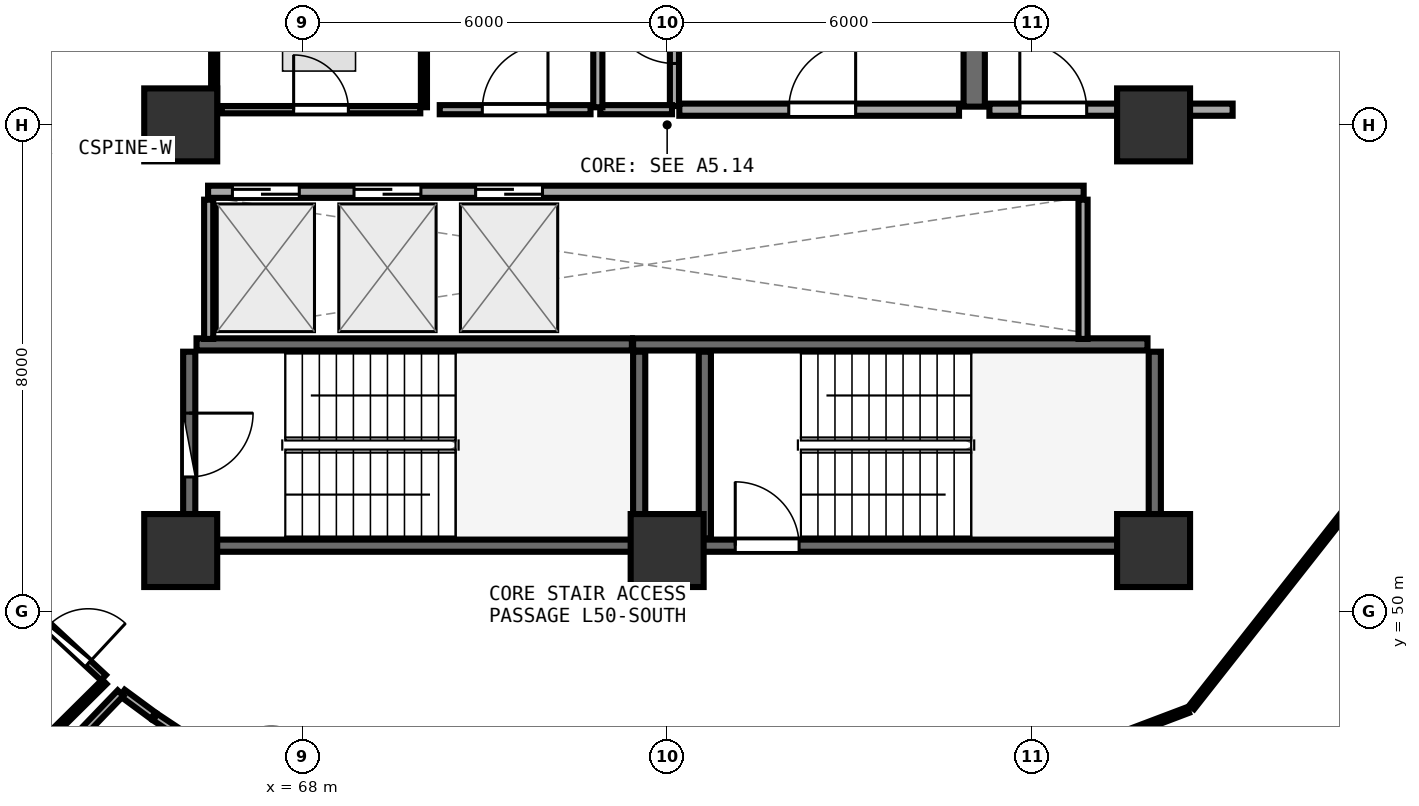
"""IFC4 building model, lengths in metres.
Left out: names, types, materials, properties, quantities, classifications, styles, units other than length and angle.
Written with IfcOpenShell. Run it as: python <this file> out.ifc"""

import sys

from ifc_helpers import new_model, si_unit, direction, frame, frame_2d, origin, origin_2d, place, context, subcontext, project, spatial, rectangle, extrude, element, fill, save


model = new_model("IFC4")
c1 = context("Model", 3, precision=1e-05, world=origin(), true_north=direction((0.0, 1.0)))
c2 = subcontext(c1, "Body", "Model", "MODEL_VIEW")
j1 = project(units=[si_unit("LENGTHUNIT", "METRE"), si_unit("PLANEANGLEUNIT", "RADIAN")], contexts=[c1])
p1 = place(None, origin())
s1 = spatial("IfcSite", under=j1, at=p1, CompositionType="ELEMENT")
p2 = place(p1, origin())
s2 = spatial("IfcBuilding", under=s1, at=p2, CompositionType="ELEMENT")
p3 = place(p2, frame((0.0, 0.0, 196.95)))
s3 = spatial("IfcBuildingStorey", under=s2, at=p3, CompositionType="ELEMENT", Elevation=196.95)
for number, where, z_axis, x_axis in (
    (1, (66.0, 51.0, 0.0), (0.0, 0.0, 1.0), (1.0, 0.0, 0.0)),
    (2, (74.0, 51.0, 0.0), (0.0, 0.0, 1.0), (1.0, 0.0, 0.0)),
    (3, (82.0, 51.0, 0.0), (0.0, 0.0, 1.0), (1.0, 0.0, 0.0)),
    (4, (82.0, 58.0, 0.0), (0.0, 0.0, 1.0), (1.0, 0.0, 0.0)),
    (5, (66.0, 58.0, 0.0), (0.0, 0.0, 1.0), (1.0, 0.0, 0.0)),
):
    element("IfcColumn", number, at=place(p3, frame(where, z_axis=z_axis, x_axis=x_axis)), inside=s3, PredefinedType="PILASTER", context=c2, shape_type="SweptSolid", body=[
        extrude(rectangle(XDim=1.2, YDim=1.2, at=origin_2d()), origin(), (0.0, 0.0, 1.0), 3.75),
    ])
p4 = place(p3, frame((74.0, 51.08, 0.0), z_axis=(0.0, 0.0, 1.0), x_axis=(1.0, 0.0, 0.0)))
e6 = element("IfcWall", 6, at=p4, inside=s3, PredefinedType="SHEAR", context=c2, shape_type="SweptSolid", body=[
    extrude(rectangle(XDim=7.9, YDim=0.2, at=frame_2d((3.95, 0.0))), origin(), (0.0, 0.0, 1.0), 3.49),
])
p5 = place(p4, frame((1.12, 0.0, 0.0)))
e7 = element("IfcOpeningElement", 7, at=p5, cuts=e6, PredefinedType="OPENING", context=c2, shape_type="SweptSolid", body=[
    extrude(rectangle(XDim=1.05, YDim=2.1, at=frame_2d((0.525, 1.05))), frame((0.0, 0.11, 0.0), z_axis=(0.0, -1.0, 0.0), x_axis=(1.0, 0.0, 0.0)), (0.0, 0.0, 1.0), 0.22),
])
p6 = place(p3, frame((82.02, 51.2, 0.0), z_axis=(0.0, 0.0, 1.0), x_axis=(0.0, 1.0, 0.0)))
e8 = element("IfcWall", 8, at=p6, inside=s3, PredefinedType="SHEAR", context=c2, shape_type="SweptSolid", body=[
    extrude(rectangle(XDim=3.07, YDim=0.2, at=frame_2d((1.535, 0.0))), origin(), (0.0, 0.0, 1.0), 3.49),
])
p7 = place(p3, frame((81.9, 54.39, 0.0), z_axis=(0.0, 0.0, 1.0), x_axis=(-1.0, 0.0, 0.0)))
e9 = element("IfcWall", 9, at=p7, inside=s3, PredefinedType="SHEAR", context=c2, shape_type="SweptSolid", body=[
    extrude(rectangle(XDim=8.46, YDim=0.2, at=frame_2d((4.23, 0.0))), origin(), (0.0, 0.0, 1.0), 3.49),
])
p8 = place(p3, frame((74.62, 54.27, 0.0), z_axis=(0.0, 0.0, 1.0), x_axis=(0.0, -1.0, 0.0)))
e10 = element("IfcWall", 10, at=p8, inside=s3, PredefinedType="SHEAR", context=c2, shape_type="SweptSolid", body=[
    extrude(rectangle(XDim=3.07, YDim=0.2, at=frame_2d((1.535, 0.0))), origin(), (0.0, 0.0, 1.0), 3.49),
])
p9 = place(p3, frame((66.26, 51.08, 0.0), z_axis=(0.0, 0.0, 1.0), x_axis=(1.0, 0.0, 0.0)))
e11 = element("IfcWall", 11, at=p9, inside=s3, PredefinedType="SHEAR", context=c2, shape_type="SweptSolid", body=[
    extrude(rectangle(XDim=7.16, YDim=0.2, at=frame_2d((3.58, 0.0))), origin(), (0.0, 0.0, 1.0), 3.49),
])
p10 = place(p3, frame((73.54, 51.2, 0.0), z_axis=(0.0, 0.0, 1.0), x_axis=(0.0, 1.0, 0.0)))
e12 = element("IfcWall", 12, at=p10, inside=s3, PredefinedType="SHEAR", context=c2, shape_type="SweptSolid", body=[
    extrude(rectangle(XDim=3.07, YDim=0.2, at=frame_2d((1.535, 0.0))), origin(), (0.0, 0.0, 1.0), 3.49),
])
p11 = place(p3, frame((73.42, 54.39, 0.0), z_axis=(0.0, 0.0, 1.0), x_axis=(-1.0, 0.0, 0.0)))
e13 = element("IfcWall", 13, at=p11, inside=s3, PredefinedType="SHEAR", context=c2, shape_type="SweptSolid", body=[
    extrude(rectangle(XDim=7.16, YDim=0.2, at=frame_2d((3.58, 0.0))), origin(), (0.0, 0.0, 1.0), 3.49),
])
p12 = place(p3, frame((66.14, 54.27, 0.0), z_axis=(0.0, 0.0, 1.0), x_axis=(0.0, -1.0, 0.0)))
e14 = element("IfcWall", 14, at=p12, inside=s3, PredefinedType="SHEAR", context=c2, shape_type="SweptSolid", body=[
    extrude(rectangle(XDim=3.07, YDim=0.2, at=frame_2d((1.535, 0.0))), origin(), (0.0, 0.0, 1.0), 3.49),
])
p13 = place(p12, frame((1.01, 0.0, 0.0)))
e15 = element("IfcOpeningElement", 15, at=p13, cuts=e14, PredefinedType="OPENING", context=c2, shape_type="SweptSolid", body=[
    extrude(rectangle(XDim=1.05, YDim=2.1, at=frame_2d((0.525, 1.05))), frame((0.0, 0.11, 0.0), z_axis=(0.0, -1.0, 0.0), x_axis=(1.0, 0.0, 0.0)), (0.0, 0.0, 1.0), 0.22),
])
p14 = place(p3, frame((79.05, 58.3, 0.0), z_axis=(0.0, 0.0, 1.0), x_axis=(0.0, 1.0, 0.0)))
e16 = element("IfcWall", 16, at=p14, inside=s3, PredefinedType="SHEAR", context=c2, shape_type="SweptSolid", body=[
    extrude(rectangle(XDim=6.3, YDim=0.35, at=frame_2d((3.15, 0.0))), origin(), (0.0, 0.0, 1.0), 3.49),
])
p15 = place(p3, frame((74.2, 58.25, 0.0), z_axis=(0.0, 0.0, 1.0), x_axis=(1.0, 0.0, 0.0)))
e17 = element("IfcWall", 17, at=p15, inside=s3, PredefinedType="SOLIDWALL", context=c2, shape_type="SweptSolid", body=[
    extrude(rectangle(XDim=4.6, YDim=0.2, at=frame_2d((2.3, 0.0))), origin(), (0.0, 0.0, 1.0), 3.48),
])
p16 = place(p15, frame((1.8, 0.0, 0.0)))
e18 = element("IfcOpeningElement", 18, at=p16, cuts=e17, PredefinedType="OPENING", context=c2, shape_type="SweptSolid", body=[
    extrude(rectangle(XDim=1.1, YDim=2.1, at=frame_2d((0.55, 1.05))), frame((0.0, 0.11, 0.0), z_axis=(0.0, -1.0, 0.0), x_axis=(1.0, 0.0, 0.0)), (0.0, 0.0, 1.0), 0.22),
])
p17 = place(p3, frame((79.3, 58.25, 0.0), z_axis=(0.0, 0.0, 1.0), x_axis=(1.0, 0.0, 0.0)))
e19 = element("IfcWall", 19, at=p17, inside=s3, PredefinedType="SOLIDWALL", context=c2, shape_type="SweptSolid", body=[
    extrude(rectangle(XDim=4.0, YDim=0.2, at=frame_2d((2.0, 0.0))), origin(), (0.0, 0.0, 1.0), 2.775),
])
p18 = place(p17, frame((0.5, 0.0, 0.0)))
e20 = element("IfcOpeningElement", 20, at=p18, cuts=e19, PredefinedType="OPENING", context=c2, shape_type="SweptSolid", body=[
    extrude(rectangle(XDim=1.1, YDim=2.1, at=frame_2d((0.55, 1.05))), frame((0.0, 0.11, 0.0), z_axis=(0.0, -1.0, 0.0), x_axis=(1.0, 0.0, 0.0)), (0.0, 0.0, 1.0), 0.22),
])
p19 = place(p3, frame((66.45, 56.9, 0.0), z_axis=(0.0, 0.0, 1.0), x_axis=(1.0, 0.0, 0.0)))
e21 = element("IfcWall", 21, at=p19, inside=s3, PredefinedType="SOLIDWALL", context=c2, shape_type="SweptSolid", body=[
    extrude(rectangle(XDim=14.4, YDim=0.2, at=frame_2d((7.2, 0.0))), origin(), (0.0, 0.0, 1.0), 3.48),
])
p20 = place(p19, frame((0.4, 0.0, 0.0)))
e22 = element("IfcOpeningElement", 22, at=p20, cuts=e21, PredefinedType="OPENING", context=c2, shape_type="SweptSolid", body=[
    extrude(rectangle(XDim=1.1, YDim=2.1, at=frame_2d((0.55, 1.05))), frame((0.0, 0.11, 0.0), z_axis=(0.0, -1.0, 0.0), x_axis=(1.0, 0.0, 0.0)), (0.0, 0.0, 1.0), 0.22),
])
p21 = place(p19, frame((2.4, 0.0, 0.0)))
e23 = element("IfcOpeningElement", 23, at=p21, cuts=e21, PredefinedType="OPENING", context=c2, shape_type="SweptSolid", body=[
    extrude(rectangle(XDim=1.1, YDim=2.1, at=frame_2d((0.55, 1.05))), frame((0.0, 0.11, 0.0), z_axis=(0.0, -1.0, 0.0), x_axis=(1.0, 0.0, 0.0)), (0.0, 0.0, 1.0), 0.22),
])
p22 = place(p19, frame((4.4, 0.0, 0.0)))
e24 = element("IfcOpeningElement", 24, at=p22, cuts=e21, PredefinedType="OPENING", context=c2, shape_type="SweptSolid", body=[
    extrude(rectangle(XDim=1.1, YDim=2.1, at=frame_2d((0.55, 1.05))), frame((0.0, 0.11, 0.0), z_axis=(0.0, -1.0, 0.0), x_axis=(1.0, 0.0, 0.0)), (0.0, 0.0, 1.0), 0.22),
])
for number, where, z_axis, x_axis in (
    (25, (66.46, 54.48, 0.0), (0.0, 0.0, 1.0), (0.0, 1.0, 0.0)),
    (26, (80.84, 54.48, 0.0), (0.0, 0.0, 1.0), (0.0, 1.0, 0.0)),
):
    element("IfcWall", number, at=place(p3, frame(where, z_axis=z_axis, x_axis=x_axis)), inside=s3, PredefinedType="PARTITIONING", context=c2, shape_type="SweptSolid", body=[
        extrude(rectangle(XDim=2.29, YDim=0.15, at=frame_2d((1.145, 0.0))), origin(), (0.0, 0.0, 1.0), 3.48),
    ])
p23 = place(p3, frame((74.12, 58.31, 0.0), z_axis=(0.0, 0.0, 1.0), x_axis=(0.0, 1.0, 0.0)))
e27 = element("IfcWall", 27, at=p23, inside=s3, PredefinedType="PARTITIONING", context=c2, shape_type="SweptSolid", body=[
    extrude(rectangle(XDim=2.48, YDim=0.15, at=frame_2d((1.24, 0.0))), origin(), (0.0, 0.0, 1.0), 3.48),
])
p24 = place(p23, frame((0.7, 0.0, 0.0)))
e28 = element("IfcOpeningElement", 28, at=p24, cuts=e27, PredefinedType="OPENING", context=c2, shape_type="SweptSolid", body=[
    extrude(rectangle(XDim=1.08, YDim=2.1, at=frame_2d((0.54, 1.05))), frame((0.0, 0.085, 0.0), z_axis=(0.0, -1.0, 0.0), x_axis=(1.0, 0.0, 0.0)), (0.0, 0.0, 1.0), 0.17),
])
p25 = place(p3, frame((66.675, 58.25, 0.0), z_axis=(0.0, 0.0, 1.0), x_axis=(1.0, 0.0, 0.0)))
e29 = element("IfcWall", 29, at=p25, inside=s3, PredefinedType="PARTITIONING", context=c2, shape_type="SweptSolid", body=[
    extrude(rectangle(XDim=3.265, YDim=0.12, at=frame_2d((1.632, 0.0))), origin(), (0.0, 0.0, 1.0), 3.48),
])
p26 = place(p25, frame((1.182, 0.0, 0.0)))
e30 = element("IfcOpeningElement", 30, at=p26, cuts=e29, PredefinedType="OPENING", context=c2, shape_type="SweptSolid", body=[
    extrude(rectangle(XDim=0.9, YDim=2.08, at=frame_2d((0.45, 1.04))), frame((0.0, 0.07, 0.0), z_axis=(0.0, -1.0, 0.0), x_axis=(1.0, 0.0, 0.0)), (0.0, 0.0, 1.0), 0.14),
])
p27 = place(p3, frame((70.26, 58.25, 0.0), z_axis=(0.0, 0.0, 1.0), x_axis=(1.0, 0.0, 0.0)))
e31 = element("IfcWall", 31, at=p27, inside=s3, PredefinedType="PARTITIONING", context=c2, shape_type="SweptSolid", body=[
    extrude(rectangle(XDim=2.48, YDim=0.15, at=frame_2d((1.24, 0.0))), origin(), (0.0, 0.0, 1.0), 3.48),
])
p28 = place(p27, frame((0.7, 0.0, 0.0)))
e32 = element("IfcOpeningElement", 32, at=p28, cuts=e31, PredefinedType="OPENING", context=c2, shape_type="SweptSolid", body=[
    extrude(rectangle(XDim=1.08, YDim=2.1, at=frame_2d((0.54, 1.05))), frame((0.0, 0.085, 0.0), z_axis=(0.0, -1.0, 0.0), x_axis=(1.0, 0.0, 0.0)), (0.0, 0.0, 1.0), 0.17),
])
p29 = place(p3, frame((63.569, 49.988, 0.0), z_axis=(0.0, 0.0, 1.0), x_axis=(0.732453034456, -0.680817561698, 0.0)))
e33 = element("IfcWall", 33, at=p29, inside=s3, PredefinedType="PARTITIONING", context=c2, shape_type="SweptSolid", body=[
    extrude(rectangle(XDim=1.584, YDim=0.12, at=frame_2d((0.792, 0.0))), origin(), (0.0, 0.0, 1.0), 3.025),
])
p30 = place(p29, frame((0.342, 0.0, 0.0)))
e34 = element("IfcOpeningElement", 34, at=p30, cuts=e33, PredefinedType="OPENING", context=c2, shape_type="SweptSolid", body=[
    extrude(rectangle(XDim=0.9, YDim=2.08, at=frame_2d((0.45, 1.04))), frame((0.0, 0.07, 0.0), z_axis=(0.0, -1.0, 0.0), x_axis=(1.0, 0.0, 0.0)), (0.0, 0.0, 1.0), 0.14),
])
p31 = place(p3, frame((72.9, 58.25, 0.0), z_axis=(0.0, 0.0, 1.0), x_axis=(1.0, 0.0, 0.0)))
e35 = element("IfcWall", 35, at=p31, inside=s3, PredefinedType="PARTITIONING", context=c2, shape_type="SweptSolid", body=[
    extrude(rectangle(XDim=1.18, YDim=0.15, at=frame_2d((0.59, 0.0))), origin(), (0.0, 0.0, 1.0), 3.48),
])
p32 = place(p3, frame((72.86, 60.81, 0.0), z_axis=(0.0, 0.0, 1.0), x_axis=(0.0, -1.0, 0.0)))
e36 = element("IfcWall", 36, at=p32, inside=s3, PredefinedType="PARTITIONING", context=c2, shape_type="SweptSolid", body=[
    extrude(rectangle(XDim=2.52, YDim=0.15, at=frame_2d((1.26, 0.0))), origin(), (0.0, 0.0, 1.0), 3.48),
])
p33 = place(p3, frame((70.0, 58.29, 0.0), z_axis=(0.0, 0.0, 1.0), x_axis=(0.0, 1.0, 0.0)))
e37 = element("IfcWall", 37, at=p33, inside=s3, PredefinedType="PARTITIONING", context=c2, shape_type="SweptSolid", body=[
    extrude(rectangle(XDim=2.39, YDim=0.1, at=frame_2d((1.195, 0.0))), origin(), (0.0, 0.0, 1.0), 3.48),
])
p34 = place(p3, frame((66.55, 60.68, 0.0), z_axis=(0.0, 0.0, 1.0), x_axis=(0.0, -1.0, 0.0)))
e38 = element("IfcWall", 38, at=p34, inside=s3, PredefinedType="PARTITIONING", context=c2, shape_type="SweptSolid", body=[
    extrude(rectangle(XDim=2.383, YDim=0.1, at=frame_2d((1.191, 0.0))), origin(), (0.0, 0.0, 1.0), 3.48),
])
p35 = place(p3, frame((75.686, 45.773, 0.0), z_axis=(0.0, 0.0, 1.0), x_axis=(0.935263689731, 0.353951734945, 0.0)))
e39 = element("IfcWall", 39, at=p35, inside=s3, PredefinedType="PARTITIONING", context=c2, shape_type="SweptSolid", body=[
    extrude(rectangle(XDim=7.355, YDim=0.1, at=frame_2d((3.678, 0.0))), origin(), (0.0, 0.0, 1.0), 3.025),
])
p36 = place(p3, frame((82.628, 48.422, 0.0), z_axis=(0.0, 0.0, 1.0), x_axis=(0.618431543907, 0.785838676511, 0.0)))
e40 = element("IfcWall", 40, at=p36, inside=s3, PredefinedType="PARTITIONING", context=c2, shape_type="SweptSolid", body=[
    extrude(rectangle(XDim=6.962, YDim=0.1, at=frame_2d((3.481, 0.0))), origin(), (0.0, 0.0, 1.0), 3.025),
])
p37 = place(p3, frame((64.745, 48.841, 0.0), z_axis=(0.0, 0.0, 1.0), x_axis=(-0.710363664194, -0.703834827635, 0.0)))
e41 = element("IfcWall", 41, at=p37, inside=s3, PredefinedType="PARTITIONING", context=c2, shape_type="SweptSolid", body=[
    extrude(rectangle(XDim=7.441, YDim=0.1, at=frame_2d((3.721, 0.0))), origin(), (0.0, 0.0, 1.0), 3.075),
])
p38 = place(p3, frame((65.04, 48.658, 0.0), z_axis=(0.0, 0.0, 1.0), x_axis=(0.804987739936, -0.593291444867, 0.0)))
e42 = element("IfcWall", 42, at=p38, inside=s3, PredefinedType="PLUMBINGWALL", context=c2, shape_type="SweptSolid", body=[
    extrude(rectangle(XDim=0.631, YDim=0.13, at=frame_2d((0.315, 0.0))), origin(), (0.0, 0.0, 1.0), 3.025),
])
p39 = place(p3, frame((65.581, 48.261, 0.0), z_axis=(0.0, 0.0, 1.0), x_axis=(0.83341242139, -0.55265155014, 0.0)))
e43 = element("IfcWall", 43, at=p39, inside=s3, PredefinedType="PLUMBINGWALL", context=c2, shape_type="SweptSolid", body=[
    extrude(rectangle(XDim=0.633, YDim=0.13, at=frame_2d((0.316, 0.0))), origin(), (0.0, 0.0, 1.0), 3.48),
])
p40 = place(p3, frame((62.465, 46.01, 0.0), z_axis=(0.0, 0.0, 1.0), x_axis=(0.693241598237, 0.720705270186, 0.0)))
e44 = element("IfcWall", 44, at=p40, inside=s3, PredefinedType="PLUMBINGWALL", context=c2, shape_type="SweptSolid", body=[
    extrude(rectangle(XDim=3.671, YDim=0.13, at=frame_2d((1.836, 0.0))), origin(), (0.0, 0.0, 1.0), 3.175),
])
p41 = place(p5, origin())
e45 = element("IfcDoor", 45, at=p41, inside=s3, OperationType="SINGLE_SWING_LEFT", PredefinedType="DOOR", context=c2, shape_type="SweptSolid", body=[
    extrude(rectangle(XDim=1.05, YDim=2.1, at=frame_2d((0.525, 1.05))), frame((0.0, 0.025, 0.0), z_axis=(0.0, -1.0, 0.0), x_axis=(1.0, 0.0, 0.0)), (0.0, 0.0, 1.0), 0.05),
])
fill(e7, e45)
p42 = place(p13, origin())
e46 = element("IfcDoor", 46, at=p42, inside=s3, OperationType="SINGLE_SWING_LEFT", PredefinedType="DOOR", context=c2, shape_type="SweptSolid", body=[
    extrude(rectangle(XDim=1.05, YDim=2.1, at=frame_2d((0.525, 1.05))), frame((0.0, 0.025, 0.0), z_axis=(0.0, -1.0, 0.0), x_axis=(1.0, 0.0, 0.0)), (0.0, 0.0, 1.0), 0.05),
])
fill(e15, e46)
p43 = place(p16, frame((1.1, 0.0, 0.0), z_axis=(0.0, 0.0, 1.0), x_axis=(-1.0, 0.0, 0.0)))
e47 = element("IfcDoor", 47, at=p43, inside=s3, OperationType="SINGLE_SWING_LEFT", PredefinedType="DOOR", context=c2, shape_type="SweptSolid", body=[
    extrude(rectangle(XDim=1.1, YDim=2.1, at=frame_2d((0.55, 1.05))), frame((0.0, 0.025, 0.0), z_axis=(0.0, -1.0, 0.0), x_axis=(1.0, 0.0, 0.0)), (0.0, 0.0, 1.0), 0.05),
])
fill(e18, e47)
p44 = place(p18, frame((1.1, 0.0, 0.0), z_axis=(0.0, 0.0, 1.0), x_axis=(-1.0, 0.0, 0.0)))
e48 = element("IfcDoor", 48, at=p44, inside=s3, OperationType="SINGLE_SWING_RIGHT", PredefinedType="DOOR", context=c2, shape_type="SweptSolid", body=[
    extrude(rectangle(XDim=1.1, YDim=2.1, at=frame_2d((0.55, 1.05))), frame((0.0, 0.025, 0.0), z_axis=(0.0, -1.0, 0.0), x_axis=(1.0, 0.0, 0.0)), (0.0, 0.0, 1.0), 0.05),
])
fill(e20, e48)
p45 = place(p20, origin())
e49 = element("IfcDoor", 49, at=p45, inside=s3, OperationType="DOUBLE_DOOR_SLIDING", PredefinedType="DOOR", context=c2, shape_type="SweptSolid", body=[
    extrude(rectangle(XDim=1.1, YDim=2.1, at=frame_2d((0.55, 1.05))), frame((0.0, 0.025, 0.0), z_axis=(0.0, -1.0, 0.0), x_axis=(1.0, 0.0, 0.0)), (0.0, 0.0, 1.0), 0.05),
])
fill(e22, e49)
p46 = place(p21, origin())
e50 = element("IfcDoor", 50, at=p46, inside=s3, OperationType="DOUBLE_DOOR_SLIDING", PredefinedType="DOOR", context=c2, shape_type="SweptSolid", body=[
    extrude(rectangle(XDim=1.1, YDim=2.1, at=frame_2d((0.55, 1.05))), frame((0.0, 0.025, 0.0), z_axis=(0.0, -1.0, 0.0), x_axis=(1.0, 0.0, 0.0)), (0.0, 0.0, 1.0), 0.05),
])
fill(e23, e50)
p47 = place(p22, origin())
e51 = element("IfcDoor", 51, at=p47, inside=s3, OperationType="DOUBLE_DOOR_SLIDING", PredefinedType="DOOR", context=c2, shape_type="SweptSolid", body=[
    extrude(rectangle(XDim=1.1, YDim=2.1, at=frame_2d((0.55, 1.05))), frame((0.0, 0.025, 0.0), z_axis=(0.0, -1.0, 0.0), x_axis=(1.0, 0.0, 0.0)), (0.0, 0.0, 1.0), 0.05),
])
fill(e24, e51)
p48 = place(p24, origin())
e52 = element("IfcDoor", 52, at=p48, inside=s3, OperationType="SINGLE_SWING_RIGHT", PredefinedType="DOOR", context=c2, shape_type="SweptSolid", body=[
    extrude(rectangle(XDim=1.08, YDim=2.1, at=frame_2d((0.54, 1.05))), frame((0.0, 0.025, 0.0), z_axis=(0.0, -1.0, 0.0), x_axis=(1.0, 0.0, 0.0)), (0.0, 0.0, 1.0), 0.05),
])
fill(e28, e52)
p49 = place(p26, origin())
e53 = element("IfcDoor", 53, at=p49, inside=s3, OperationType="SINGLE_SWING_LEFT", PredefinedType="DOOR", context=c2, shape_type="SweptSolid", body=[
    extrude(rectangle(XDim=0.9, YDim=2.08, at=frame_2d((0.45, 1.04))), frame((0.0, 0.025, 0.0), z_axis=(0.0, -1.0, 0.0), x_axis=(1.0, 0.0, 0.0)), (0.0, 0.0, 1.0), 0.05),
])
fill(e30, e53)
p50 = place(p28, origin())
e54 = element("IfcDoor", 54, at=p50, inside=s3, OperationType="SINGLE_SWING_RIGHT", PredefinedType="DOOR", context=c2, shape_type="SweptSolid", body=[
    extrude(rectangle(XDim=1.08, YDim=2.1, at=frame_2d((0.54, 1.05))), frame((0.0, 0.025, 0.0), z_axis=(0.0, -1.0, 0.0), x_axis=(1.0, 0.0, 0.0)), (0.0, 0.0, 1.0), 0.05),
])
fill(e32, e54)
p51 = place(p30, origin())
e55 = element("IfcDoor", 55, at=p51, inside=s3, OperationType="SINGLE_SWING_RIGHT", PredefinedType="DOOR", context=c2, shape_type="SweptSolid", body=[
    extrude(rectangle(XDim=0.9, YDim=2.08, at=frame_2d((0.45, 1.04))), frame((0.0, 0.025, 0.0), z_axis=(0.0, -1.0, 0.0), x_axis=(1.0, 0.0, 0.0)), (0.0, 0.0, 1.0), 0.05),
])
fill(e34, e55)
save(model, sys.argv[1])
